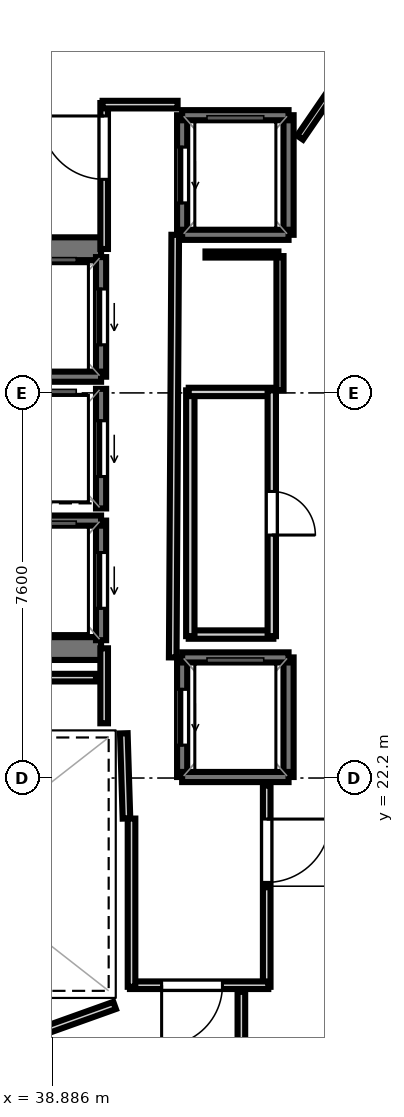
"""IFC4 building model, lengths in metres.
Left out: names, types, materials, properties, quantities, classifications, styles, units other than length and angle.
Written with IfcOpenShell. Run it as: python <this file> out.ifc"""

import sys

from ifc_helpers import new_model, si_unit, direction, frame, frame_2d, origin, place, context, subcontext, project, spatial, rectangle, extrude, element, fill, save


model = new_model("IFC4")
c1 = context("Model", 3, precision=1e-05, world=origin(), true_north=direction((0.0, 1.0)))
c2 = subcontext(c1, "Body", "Model", "MODEL_VIEW")
j1 = project(units=[si_unit("LENGTHUNIT", "METRE"), si_unit("PLANEANGLEUNIT", "RADIAN")], contexts=[c1])
p1 = place(None, origin())
s1 = spatial("IfcSite", under=j1, at=p1, CompositionType="ELEMENT")
p2 = place(p1, origin())
s2 = spatial("IfcBuilding", under=s1, at=p2, CompositionType="ELEMENT")
p3 = place(p2, frame((0.0, 0.0, 329.6)))
s3 = spatial("IfcBuildingStorey", under=s2, at=p3, CompositionType="ELEMENT", Elevation=329.6)
p4 = place(p3, frame((29.33, 32.645, 0.0), z_axis=(0.0, 0.0, 1.0), x_axis=(1.0, 0.0, 0.0)))
e1 = element("IfcWall", 1, at=p4, inside=s3, PredefinedType="SHEAR", context=c2, shape_type="SweptSolid", body=[
    extrude(rectangle(XDim=10.52, YDim=0.45, at=frame_2d((5.26, 0.0))), origin(), (0.0, 0.0, 1.0), 3.52),
])
p5 = place(p4, frame((0.895, 0.0, 0.0)))
e2 = element("IfcOpeningElement", 2, at=p5, cuts=e1, PredefinedType="OPENING", context=c2, shape_type="SweptSolid", body=[
    extrude(rectangle(XDim=1.25, YDim=2.15, at=frame_2d((0.625, 1.075))), frame((0.0, 0.235, 0.0), z_axis=(0.0, -1.0, 0.0), x_axis=(1.0, 0.0, 0.0)), (0.0, 0.0, 1.0), 0.47),
])
p6 = place(p3, frame((29.33, 24.755, 0.0), z_axis=(0.0, 0.0, 1.0), x_axis=(1.0, 0.0, 0.0)))
e3 = element("IfcWall", 3, at=p6, inside=s3, PredefinedType="SHEAR", context=c2, shape_type="SweptSolid", body=[
    extrude(rectangle(XDim=10.52, YDim=0.45, at=frame_2d((5.26, 0.0))), origin(), (0.0, 0.0, 1.0), 3.52),
])
p7 = place(p6, frame((0.695, 0.0, 0.0)))
e4 = element("IfcOpeningElement", 4, at=p7, cuts=e3, PredefinedType="OPENING", context=c2, shape_type="SweptSolid", body=[
    extrude(rectangle(XDim=1.25, YDim=2.15, at=frame_2d((0.625, 1.075))), frame((0.0, 0.235, 0.0), z_axis=(0.0, -1.0, 0.0), x_axis=(1.0, 0.0, 0.0)), (0.0, 0.0, 1.0), 0.47),
])
p8 = place(p3, frame((39.85, 30.12, 0.0), z_axis=(0.0, 0.0, 1.0), x_axis=(0.0, 1.0, 0.0)))
e5 = element("IfcWall", 5, at=p8, inside=s3, PredefinedType="SOLIDWALL", context=c2, shape_type="SweptSolid", body=[
    extrude(rectangle(XDim=2.36, YDim=0.2, at=frame_2d((1.18, 0.0))), origin(), (0.0, 0.0, 1.0), 3.52),
])
p9 = place(p8, frame((0.63, 0.0, 0.0)))
e6 = element("IfcOpeningElement", 6, at=p9, cuts=e5, PredefinedType="OPENING", context=c2, shape_type="SweptSolid", body=[
    extrude(rectangle(XDim=1.1, YDim=2.15, at=frame_2d((0.55, 1.075))), frame((0.0, 0.11, 0.0), z_axis=(0.0, -1.0, 0.0), x_axis=(1.0, 0.0, 0.0)), (0.0, 0.0, 1.0), 0.22),
])
p10 = place(p3, frame((37.75, 30.12, 0.0), z_axis=(0.0, 0.0, 1.0), x_axis=(1.0, 0.0, 0.0)))
e7 = element("IfcWall", 7, at=p10, inside=s3, PredefinedType="SOLIDWALL", context=c2, shape_type="SweptSolid", body=[
    extrude(rectangle(XDim=2.1, YDim=0.2, at=frame_2d((1.05, 0.0))), origin(), (0.0, 0.0, 1.0), 3.52),
])
p11 = place(p3, frame((39.85, 24.92, 0.0), z_axis=(0.0, 0.0, 1.0), x_axis=(0.0, 1.0, 0.0)))
e8 = element("IfcWall", 8, at=p11, inside=s3, PredefinedType="SOLIDWALL", context=c2, shape_type="SweptSolid", body=[
    extrude(rectangle(XDim=2.36, YDim=0.2, at=frame_2d((1.18, 0.0))), origin(), (0.0, 0.0, 1.0), 3.52),
])
p12 = place(p11, frame((0.63, 0.0, 0.0)))
e9 = element("IfcOpeningElement", 9, at=p12, cuts=e8, PredefinedType="OPENING", context=c2, shape_type="SweptSolid", body=[
    extrude(rectangle(XDim=1.1, YDim=2.15, at=frame_2d((0.55, 1.075))), frame((0.0, 0.11, 0.0), z_axis=(0.0, -1.0, 0.0), x_axis=(1.0, 0.0, 0.0)), (0.0, 0.0, 1.0), 0.22),
])
p13 = place(p3, frame((37.75, 27.28, 0.0), z_axis=(0.0, 0.0, 1.0), x_axis=(1.0, 0.0, 0.0)))
e10 = element("IfcWall", 10, at=p13, inside=s3, PredefinedType="SOLIDWALL", context=c2, shape_type="SweptSolid", body=[
    extrude(rectangle(XDim=2.1, YDim=0.2, at=frame_2d((1.05, 0.0))), origin(), (0.0, 0.0, 1.0), 3.52),
])
p14 = place(p3, frame((39.85, 27.52, 0.0), z_axis=(0.0, 0.0, 1.0), x_axis=(0.0, 1.0, 0.0)))
e11 = element("IfcWall", 11, at=p14, inside=s3, PredefinedType="SOLIDWALL", context=c2, shape_type="SweptSolid", body=[
    extrude(rectangle(XDim=2.36, YDim=0.2, at=frame_2d((1.18, 0.0))), origin(), (0.0, 0.0, 1.0), 3.52),
])
p15 = place(p14, frame((0.63, 0.0, 0.0)))
e12 = element("IfcOpeningElement", 12, at=p15, cuts=e11, PredefinedType="OPENING", context=c2, shape_type="SweptSolid", body=[
    extrude(rectangle(XDim=1.1, YDim=2.15, at=frame_2d((0.55, 1.075))), frame((0.0, 0.11, 0.0), z_axis=(0.0, -1.0, 0.0), x_axis=(1.0, 0.0, 0.0)), (0.0, 0.0, 1.0), 0.22),
])
p16 = place(p3, frame((43.55, 22.22, 0.0), z_axis=(0.0, 0.0, 1.0), x_axis=(0.0, 1.0, 0.0)))
e13 = element("IfcWall", 13, at=p16, inside=s3, PredefinedType="SOLIDWALL", context=c2, shape_type="SweptSolid", body=[
    extrude(rectangle(XDim=2.36, YDim=0.2, at=frame_2d((1.18, 0.0))), origin(), (0.0, 0.0, 1.0), 3.52),
])
p17 = place(p3, frame((41.45, 22.22, 0.0), z_axis=(0.0, 0.0, 1.0), x_axis=(0.0, 1.0, 0.0)))
e14 = element("IfcWall", 14, at=p17, inside=s3, PredefinedType="SOLIDWALL", context=c2, shape_type="SweptSolid", body=[
    extrude(rectangle(XDim=2.36, YDim=0.2, at=frame_2d((1.18, 0.0))), origin(), (0.0, 0.0, 1.0), 3.52),
])
p18 = place(p17, frame((0.63, 0.0, 0.0)))
e15 = element("IfcOpeningElement", 15, at=p18, cuts=e14, PredefinedType="OPENING", context=c2, shape_type="SweptSolid", body=[
    extrude(rectangle(XDim=1.1, YDim=2.15, at=frame_2d((0.55, 1.075))), frame((0.0, 0.11, 0.0), z_axis=(0.0, -1.0, 0.0), x_axis=(1.0, 0.0, 0.0)), (0.0, 0.0, 1.0), 0.22),
])
for number, where, z_axis, x_axis in (
    (16, (41.45, 24.58, 0.0), (0.0, 0.0, 1.0), (1.0, 0.0, 0.0)),
    (17, (41.45, 22.22, 0.0), (0.0, 0.0, 1.0), (1.0, 0.0, 0.0)),
):
    element("IfcWall", number, at=place(p3, frame(where, z_axis=z_axis, x_axis=x_axis)), inside=s3, PredefinedType="SOLIDWALL", context=c2, shape_type="SweptSolid", body=[
        extrude(rectangle(XDim=2.1, YDim=0.2, at=frame_2d((1.05, 0.0))), origin(), (0.0, 0.0, 1.0), 3.52),
    ])
p19 = place(p3, frame((43.55, 32.92, 0.0), z_axis=(0.0, 0.0, 1.0), x_axis=(0.0, 1.0, 0.0)))
e18 = element("IfcWall", 18, at=p19, inside=s3, PredefinedType="SOLIDWALL", context=c2, shape_type="SweptSolid", body=[
    extrude(rectangle(XDim=2.36, YDim=0.2, at=frame_2d((1.18, 0.0))), origin(), (0.0, 0.0, 1.0), 3.52),
])
p20 = place(p3, frame((41.45, 32.92, 0.0), z_axis=(0.0, 0.0, 1.0), x_axis=(0.0, 1.0, 0.0)))
e19 = element("IfcWall", 19, at=p20, inside=s3, PredefinedType="SOLIDWALL", context=c2, shape_type="SweptSolid", body=[
    extrude(rectangle(XDim=2.36, YDim=0.2, at=frame_2d((1.18, 0.0))), origin(), (0.0, 0.0, 1.0), 3.52),
])
p21 = place(p20, frame((0.63, 0.0, 0.0)))
e20 = element("IfcOpeningElement", 20, at=p21, cuts=e19, PredefinedType="OPENING", context=c2, shape_type="SweptSolid", body=[
    extrude(rectangle(XDim=1.1, YDim=2.15, at=frame_2d((0.55, 1.075))), frame((0.0, 0.11, 0.0), z_axis=(0.0, -1.0, 0.0), x_axis=(1.0, 0.0, 0.0)), (0.0, 0.0, 1.0), 0.22),
])
for number, where, z_axis, x_axis in (
    (21, (41.45, 35.28, 0.0), (0.0, 0.0, 1.0), (1.0, 0.0, 0.0)),
    (22, (41.45, 32.92, 0.0), (0.0, 0.0, 1.0), (1.0, 0.0, 0.0)),
):
    element("IfcWall", number, at=place(p3, frame(where, z_axis=z_axis, x_axis=x_axis)), inside=s3, PredefinedType="SOLIDWALL", context=c2, shape_type="SweptSolid", body=[
        extrude(rectangle(XDim=2.1, YDim=0.2, at=frame_2d((1.05, 0.0))), origin(), (0.0, 0.0, 1.0), 3.52),
    ])
p22 = place(p3, frame((40.351, 21.401, 0.0), z_axis=(0.0, 0.0, 1.0), x_axis=(-0.031058045979, 0.999517582527, 0.0)))
e23 = element("IfcWall", 23, at=p22, inside=s3, PredefinedType="PARTITIONING", context=c2, shape_type="SweptSolid", body=[
    extrude(rectangle(XDim=1.682, YDim=0.15, at=frame_2d((0.841, 0.0))), origin(), (0.0, 0.0, 1.0), 2.84),
])
p23 = place(p3, frame((39.911, 23.28, 0.0), z_axis=(0.0, 0.0, 1.0), x_axis=(0.0, 1.0, 0.0)))
e24 = element("IfcWall", 24, at=p23, inside=s3, PredefinedType="PARTITIONING", context=c2, shape_type="SweptSolid", body=[
    extrude(rectangle(XDim=1.48, YDim=0.15, at=frame_2d((0.74, 0.0))), origin(), (0.0, 0.0, 1.0), 2.84),
])
p24 = place(p3, frame((39.911, 32.64, 0.0), z_axis=(0.0, 0.0, 1.0), x_axis=(0.0, 1.0, 0.0)))
e25 = element("IfcWall", 25, at=p24, inside=s3, PredefinedType="PARTITIONING", context=c2, shape_type="SweptSolid", body=[
    extrude(rectangle(XDim=2.88, YDim=0.15, at=frame_2d((1.44, 0.0))), origin(), (0.0, 0.0, 1.0), 2.84),
])
p25 = place(p24, frame((1.375, 0.0, 0.0)))
e26 = element("IfcOpeningElement", 26, at=p25, cuts=e25, PredefinedType="OPENING", context=c2, shape_type="SweptSolid", body=[
    extrude(rectangle(XDim=1.25, YDim=2.2, at=frame_2d((0.625, 1.1))), frame((0.0, 0.085, 0.0), z_axis=(0.0, -1.0, 0.0), x_axis=(1.0, 0.0, 0.0)), (0.0, 0.0, 1.0), 0.17),
])
p26 = place(p3, frame((39.88, 35.489, 0.0), z_axis=(0.0, 0.0, 1.0), x_axis=(1.0, 0.0, 0.0)))
e27 = element("IfcWall", 27, at=p26, inside=s3, PredefinedType="PARTITIONING", context=c2, shape_type="SweptSolid", body=[
    extrude(rectangle(XDim=1.48, YDim=0.15, at=frame_2d((0.74, 0.0))), origin(), (0.0, 0.0, 1.0), 2.84),
])
p27 = place(p3, frame((41.313, 32.92, 0.0), z_axis=(0.0, 0.0, 1.0), x_axis=(-0.005942518022, -0.999982343084, 0.0)))
e28 = element("IfcWall", 28, at=p27, inside=s3, PredefinedType="PARTITIONING", context=c2, shape_type="SweptSolid", body=[
    extrude(rectangle(XDim=8.34, YDim=0.15, at=frame_2d((4.17, 0.0))), origin(), (0.0, 0.0, 1.0), 2.84),
])
p28 = place(p3, frame((43.119, 22.05, 0.0), z_axis=(0.0, 0.0, 1.0), x_axis=(0.0, -1.0, 0.0)))
e29 = element("IfcWall", 29, at=p28, inside=s3, PredefinedType="PARTITIONING", context=c2, shape_type="SweptSolid", body=[
    extrude(rectangle(XDim=3.97, YDim=0.15, at=frame_2d((1.985, 0.0))), origin(), (0.0, 0.0, 1.0), 2.84),
])
p29 = place(p28, frame((0.66, 0.0, 0.0)))
e30 = element("IfcOpeningElement", 30, at=p29, cuts=e29, PredefinedType="OPENING", context=c2, shape_type="SweptSolid", body=[
    extrude(rectangle(XDim=1.25, YDim=2.2, at=frame_2d((0.625, 1.1))), frame((0.0, 0.085, 0.0), z_axis=(0.0, -1.0, 0.0), x_axis=(1.0, 0.0, 0.0)), (0.0, 0.0, 1.0), 0.17),
])
p30 = place(p3, frame((43.15, 18.111, 0.0), z_axis=(0.0, 0.0, 1.0), x_axis=(-1.0, 0.0, 0.0)))
e31 = element("IfcWall", 31, at=p30, inside=s3, PredefinedType="PARTITIONING", context=c2, shape_type="SweptSolid", body=[
    extrude(rectangle(XDim=2.73, YDim=0.15, at=frame_2d((1.365, 0.0))), origin(), (0.0, 0.0, 1.0), 2.84),
])
p31 = place(p30, frame((0.905, 0.0, 0.0)))
e32 = element("IfcOpeningElement", 32, at=p31, cuts=e31, PredefinedType="OPENING", context=c2, shape_type="SweptSolid", body=[
    extrude(rectangle(XDim=1.2, YDim=2.15, at=frame_2d((0.6, 1.075))), frame((0.0, 0.085, 0.0), z_axis=(0.0, -1.0, 0.0), x_axis=(1.0, 0.0, 0.0)), (0.0, 0.0, 1.0), 0.17),
])
p32 = place(p3, frame((40.451, 18.08, 0.0), z_axis=(0.0, 0.0, 1.0), x_axis=(0.0, 1.0, 0.0)))
e33 = element("IfcWall", 33, at=p32, inside=s3, PredefinedType="PARTITIONING", context=c2, shape_type="SweptSolid", body=[
    extrude(rectangle(XDim=3.32, YDim=0.15, at=frame_2d((1.66, 0.0))), origin(), (0.0, 0.0, 1.0), 2.84),
])
p33 = place(p3, frame((43.25, 25.031, 0.0), z_axis=(0.0, 0.0, 1.0), x_axis=(-1.0, 0.0, 0.0)))
e34 = element("IfcWall", 34, at=p33, inside=s3, PredefinedType="PLUMBINGWALL", context=c2, shape_type="SweptSolid", body=[
    extrude(rectangle(XDim=1.67, YDim=0.165, at=frame_2d((0.835, 0.0))), origin(), (0.0, 0.0, 1.0), 2.84),
])
p34 = place(p3, frame((41.611, 25.0, 0.0), z_axis=(0.0, 0.0, 1.0), x_axis=(0.0, 1.0, 0.0)))
e35 = element("IfcWall", 35, at=p34, inside=s3, PredefinedType="PLUMBINGWALL", context=c2, shape_type="SweptSolid", body=[
    extrude(rectangle(XDim=4.85, YDim=0.165, at=frame_2d((2.425, 0.0))), origin(), (0.0, 0.0, 1.0), 2.84),
])
p35 = place(p3, frame((41.58, 29.819, 0.0), z_axis=(0.0, 0.0, 1.0), x_axis=(1.0, 0.0, 0.0)))
e36 = element("IfcWall", 36, at=p35, inside=s3, PredefinedType="PLUMBINGWALL", context=c2, shape_type="SweptSolid", body=[
    extrude(rectangle(XDim=1.67, YDim=0.165, at=frame_2d((0.835, 0.0))), origin(), (0.0, 0.0, 1.0), 2.84),
])
p36 = place(p3, frame((43.219, 29.85, 0.0), z_axis=(0.0, 0.0, 1.0), x_axis=(0.0, -1.0, 0.0)))
e37 = element("IfcWall", 37, at=p36, inside=s3, PredefinedType="PLUMBINGWALL", context=c2, shape_type="SweptSolid", body=[
    extrude(rectangle(XDim=4.85, YDim=0.165, at=frame_2d((2.425, 0.0))), origin(), (0.0, 0.0, 1.0), 2.84),
])
p37 = place(p36, frame((1.995, 0.0, 0.0)))
e38 = element("IfcOpeningElement", 38, at=p37, cuts=e37, PredefinedType="OPENING", context=c2, shape_type="SweptSolid", body=[
    extrude(rectangle(XDim=0.86, YDim=2.05, at=frame_2d((0.43, 1.025))), frame((0.0, 0.093, 0.0), z_axis=(0.0, -1.0, 0.0), x_axis=(1.0, 0.0, 0.0)), (0.0, 0.0, 1.0), 0.185),
])
p38 = place(p3, frame((39.75, 24.181, 0.0), z_axis=(0.0, 0.0, 1.0), x_axis=(-1.0, 0.0, 0.0)))
e39 = element("IfcWall", 39, at=p38, inside=s3, PredefinedType="PARTITIONING", context=c2, shape_type="SweptSolid", body=[
    extrude(rectangle(XDim=6.22, YDim=0.15, at=frame_2d((3.11, 0.0))), origin(), (0.0, 0.0, 1.0), 2.84),
])
p39 = place(p3, frame((36.81, 16.529, 0.0), z_axis=(0.0, 0.0, 1.0), x_axis=(0.941548344365, 0.33687789364, 0.0)))
e40 = element("IfcWall", 40, at=p39, inside=s3, PredefinedType="PARTITIONING", context=c2, shape_type="SweptSolid", body=[
    extrude(rectangle(XDim=3.513, YDim=0.15, at=frame_2d((1.756, 0.0))), origin(), (0.0, 0.0, 1.0), 2.84),
])
p40 = place(p3, frame((42.619, 17.98, 0.0), z_axis=(0.0, 0.0, 1.0), x_axis=(0.0, -1.0, 0.0)))
e41 = element("IfcWall", 41, at=p40, inside=s3, PredefinedType="PARTITIONING", context=c2, shape_type="SweptSolid", body=[
    extrude(rectangle(XDim=1.93, YDim=0.15, at=frame_2d((0.965, 0.0))), origin(), (0.0, 0.0, 1.0), 2.84),
])
p41 = place(p3, frame((47.429, 40.167, 0.0), z_axis=(0.0, 0.0, 1.0), x_axis=(-0.565275724273, -0.824902027848, 0.0)))
e42 = element("IfcWall", 42, at=p41, inside=s3, PredefinedType="PARTITIONING", context=c2, shape_type="SweptSolid", body=[
    extrude(rectangle(XDim=6.461, YDim=0.14, at=frame_2d((3.23, 0.0))), origin(), (0.0, 0.0, 1.0), 2.84),
])
p42 = place(p3, frame((54.17, 39.373, 0.0), z_axis=(0.0, 0.0, 1.0), x_axis=(-0.399821133612, -0.916593181907, 0.0)))
e43 = element("IfcWall", 43, at=p42, inside=s3, PredefinedType="PARTITIONING", context=c2, shape_type="SweptSolid", body=[
    extrude(rectangle(XDim=34.925, YDim=0.12, at=frame_2d((17.462, 0.0))), origin(), (0.0, 0.0, 1.0), 2.84),
])
p43 = place(p3, frame((43.381, 29.85, 0.0), z_axis=(0.0, 0.0, 1.0), x_axis=(0.0, 1.0, 0.0)))
e44 = element("IfcWall", 44, at=p43, inside=s3, PredefinedType="PARTITIONING", context=c2, shape_type="SweptSolid", body=[
    extrude(rectangle(XDim=2.65, YDim=0.14, at=frame_2d((1.325, 0.0))), origin(), (0.0, 0.0, 1.0), 2.84),
])
p44 = place(p3, frame((43.35, 32.531, 0.0), z_axis=(0.0, 0.0, 1.0), x_axis=(-1.0, 0.0, 0.0)))
e45 = element("IfcWall", 45, at=p44, inside=s3, PredefinedType="PARTITIONING", context=c2, shape_type="SweptSolid", body=[
    extrude(rectangle(XDim=1.439, YDim=0.12, at=frame_2d((0.72, 0.0))), origin(), (0.0, 0.0, 1.0), 2.84),
])
p45 = place(p9, origin())
e46 = element("IfcDoor", 46, at=p45, inside=s3, OperationType="SLIDING_TO_LEFT", PredefinedType="DOOR", context=c2, shape_type="SweptSolid", body=[
    extrude(rectangle(XDim=1.1, YDim=2.15, at=frame_2d((0.55, 1.075))), frame((0.0, 0.025, 0.0), z_axis=(0.0, -1.0, 0.0), x_axis=(1.0, 0.0, 0.0)), (0.0, 0.0, 1.0), 0.05),
])
fill(e6, e46)
p46 = place(p12, origin())
e47 = element("IfcDoor", 47, at=p46, inside=s3, OperationType="SLIDING_TO_LEFT", PredefinedType="DOOR", context=c2, shape_type="SweptSolid", body=[
    extrude(rectangle(XDim=1.1, YDim=2.15, at=frame_2d((0.55, 1.075))), frame((0.0, 0.025, 0.0), z_axis=(0.0, -1.0, 0.0), x_axis=(1.0, 0.0, 0.0)), (0.0, 0.0, 1.0), 0.05),
])
fill(e9, e47)
p47 = place(p15, origin())
e48 = element("IfcDoor", 48, at=p47, inside=s3, OperationType="SLIDING_TO_LEFT", PredefinedType="DOOR", context=c2, shape_type="SweptSolid", body=[
    extrude(rectangle(XDim=1.1, YDim=2.15, at=frame_2d((0.55, 1.075))), frame((0.0, 0.025, 0.0), z_axis=(0.0, -1.0, 0.0), x_axis=(1.0, 0.0, 0.0)), (0.0, 0.0, 1.0), 0.05),
])
fill(e12, e48)
p48 = place(p18, origin())
e49 = element("IfcDoor", 49, at=p48, inside=s3, OperationType="SLIDING_TO_LEFT", PredefinedType="DOOR", context=c2, shape_type="SweptSolid", body=[
    extrude(rectangle(XDim=1.1, YDim=2.15, at=frame_2d((0.55, 1.075))), frame((0.0, 0.025, 0.0), z_axis=(0.0, -1.0, 0.0), x_axis=(1.0, 0.0, 0.0)), (0.0, 0.0, 1.0), 0.05),
])
fill(e15, e49)
p49 = place(p21, origin())
e50 = element("IfcDoor", 50, at=p49, inside=s3, OperationType="SLIDING_TO_LEFT", PredefinedType="DOOR", context=c2, shape_type="SweptSolid", body=[
    extrude(rectangle(XDim=1.1, YDim=2.15, at=frame_2d((0.55, 1.075))), frame((0.0, 0.025, 0.0), z_axis=(0.0, -1.0, 0.0), x_axis=(1.0, 0.0, 0.0)), (0.0, 0.0, 1.0), 0.05),
])
fill(e20, e50)
p50 = place(p31, origin())
e51 = element("IfcDoor", 51, at=p50, inside=s3, OperationType="SINGLE_SWING_RIGHT", PredefinedType="DOOR", context=c2, shape_type="SweptSolid", body=[
    extrude(rectangle(XDim=1.2, YDim=2.15, at=frame_2d((0.6, 1.075))), frame((0.0, 0.025, 0.0), z_axis=(0.0, -1.0, 0.0), x_axis=(1.0, 0.0, 0.0)), (0.0, 0.0, 1.0), 0.05),
])
fill(e32, e51)
p51 = place(p25, origin())
e52 = element("IfcDoor", 52, at=p51, inside=s3, OperationType="SINGLE_SWING_RIGHT", PredefinedType="DOOR", context=c2, shape_type="SweptSolid", body=[
    extrude(rectangle(XDim=1.25, YDim=2.2, at=frame_2d((0.625, 1.1))), frame((0.0, 0.025, 0.0), z_axis=(0.0, -1.0, 0.0), x_axis=(1.0, 0.0, 0.0)), (0.0, 0.0, 1.0), 0.05),
])
fill(e26, e52)
p52 = place(p29, origin())
e53 = element("IfcDoor", 53, at=p52, inside=s3, OperationType="SINGLE_SWING_LEFT", PredefinedType="DOOR", context=c2, shape_type="SweptSolid", body=[
    extrude(rectangle(XDim=1.25, YDim=2.2, at=frame_2d((0.625, 1.1))), frame((0.0, 0.025, 0.0), z_axis=(0.0, -1.0, 0.0), x_axis=(1.0, 0.0, 0.0)), (0.0, 0.0, 1.0), 0.05),
])
fill(e30, e53)
p53 = place(p37, origin())
e54 = element("IfcDoor", 54, at=p53, inside=s3, OperationType="SINGLE_SWING_RIGHT", PredefinedType="DOOR", context=c2, shape_type="SweptSolid", body=[
    extrude(rectangle(XDim=0.86, YDim=2.05, at=frame_2d((0.43, 1.025))), frame((0.0, 0.025, 0.0), z_axis=(0.0, -1.0, 0.0), x_axis=(1.0, 0.0, 0.0)), (0.0, 0.0, 1.0), 0.05),
])
fill(e38, e54)
save(model, sys.argv[1])
